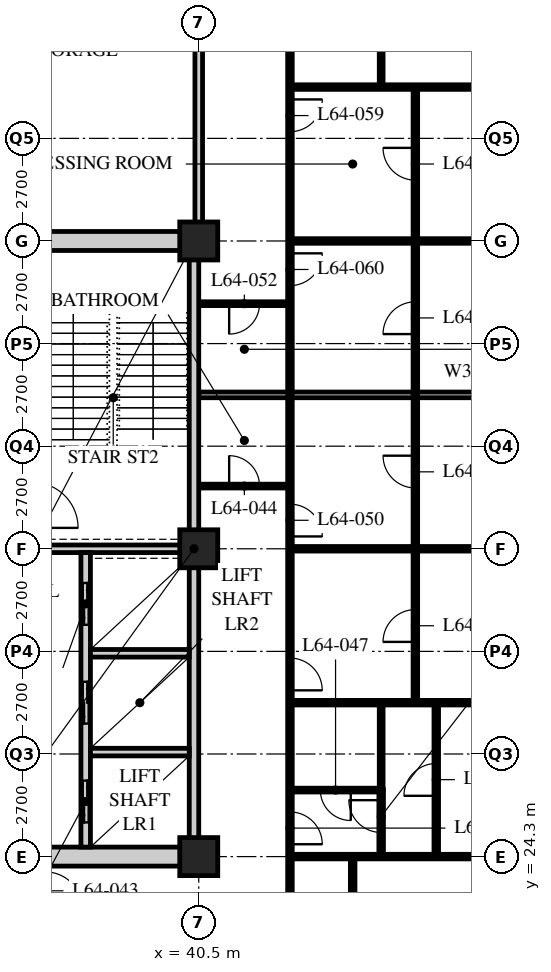
"""IFC4 building model, lengths in metres.
Left out: names, types, materials, properties, quantities, classifications, styles, units other than length and angle.
Written with IfcOpenShell. Run it as: python <this file> out.ifc"""

import sys

from ifc_helpers import new_model, si_unit, direction, frame, frame_2d, origin, origin_2d, place, context, subcontext, project, spatial, rectangle, hollow_rectangle, extrude, element, fill, save


model = new_model("IFC4")
c1 = context("Model", 3, precision=1e-05, world=origin(), true_north=direction((0.0, 1.0)))
c2 = subcontext(c1, "Body", "Model", "MODEL_VIEW")
j1 = project(units=[si_unit("LENGTHUNIT", "METRE"), si_unit("PLANEANGLEUNIT", "RADIAN")], contexts=[c1])
p1 = place(None, origin())
s1 = spatial("IfcSite", under=j1, at=p1, CompositionType="ELEMENT")
p2 = place(p1, origin())
s2 = spatial("IfcBuilding", under=s1, at=p2, CompositionType="ELEMENT")
p3 = place(p2, frame((0.0, 0.0, 250.2)))
s3 = spatial("IfcBuildingStorey", under=s2, at=p3, CompositionType="ELEMENT", Elevation=250.2)
for number, where, z_axis, x_axis in (
    (1, (40.5, 24.3, 0.0), (0.0, 0.0, 1.0), (1.0, 0.0, 0.0)),
    (2, (40.5, 32.4, 0.0), (0.0, 0.0, 1.0), (1.0, 0.0, 0.0)),
    (3, (40.5, 40.5, 0.0), (0.0, 0.0, 1.0), (1.0, 0.0, 0.0)),
):
    element("IfcColumn", number, at=place(p3, frame(where, z_axis=z_axis, x_axis=x_axis)), inside=s3, PredefinedType="COLUMN", context=c2, shape_type="SweptSolid", body=[
        extrude(hollow_rectangle(XDim=1.0, YDim=1.0, WallThickness=0.1, at=origin_2d()), origin(), (0.0, 0.0, 1.0), 3.9),
    ])
p4 = place(p3, frame((40.5, 40.5, 0.0), z_axis=(0.0, 0.0, 1.0), x_axis=(0.0, 1.0, 0.0)))
e4 = element("IfcWall", 4, at=p4, inside=s3, PredefinedType="SOLIDWALL", context=c2, shape_type="SweptSolid", body=[
    extrude(rectangle(XDim=10.35, YDim=0.2, at=frame_2d((5.175, 0.0))), origin(), (0.0, 0.0, 1.0), 3.078),
])
p5 = place(p3, frame((40.5, 34.05, 0.0), z_axis=(0.0, 0.0, 1.0), x_axis=(1.0, 0.0, 0.0)))
e5 = element("IfcWall", 5, at=p5, inside=s3, PredefinedType="PARTITIONING", context=c2, shape_type="SweptSolid", body=[
    extrude(rectangle(XDim=2.4, YDim=0.1, at=frame_2d((1.2, 0.0))), origin(), (0.0, 0.0, 1.0), 3.69),
])
p6 = place(p5, frame((0.8, 0.0, 0.0)))
e6 = element("IfcOpeningElement", 6, at=p6, cuts=e5, PredefinedType="OPENING", context=c2, shape_type="SweptSolid", body=[
    extrude(rectangle(XDim=0.8, YDim=2.1, at=frame_2d((0.4, 1.05))), frame((0.0, 0.06, 0.0), z_axis=(0.0, -1.0, 0.0), x_axis=(1.0, 0.0, 0.0)), (0.0, 0.0, 1.0), 0.12),
])
p7 = place(p3, frame((42.9, 22.5, 0.0), z_axis=(0.0, 0.0, 1.0), x_axis=(0.0, 1.0, 0.0)))
e7 = element("IfcWall", 7, at=p7, inside=s3, PredefinedType="PARTITIONING", context=c2, shape_type="SweptSolid", body=[
    extrude(rectangle(XDim=13.95, YDim=0.12, at=frame_2d((6.975, 0.0))), origin(), (0.0, 0.0, 1.0), 3.69),
])
p8 = place(p7, frame((2.125, 0.0, 0.0)))
e8 = element("IfcOpeningElement", 8, at=p8, cuts=e7, PredefinedType="OPENING", context=c2, shape_type="SweptSolid", body=[
    extrude(rectangle(XDim=0.85, YDim=2.1, at=frame_2d((0.425, 1.05))), frame((0.0, 0.07, 0.0), z_axis=(0.0, -1.0, 0.0), x_axis=(1.0, 0.0, 0.0)), (0.0, 0.0, 1.0), 0.14),
])
p9 = place(p7, frame((6.175, 0.0, 0.0)))
e9 = element("IfcOpeningElement", 9, at=p9, cuts=e7, PredefinedType="OPENING", context=c2, shape_type="SweptSolid", body=[
    extrude(rectangle(XDim=0.85, YDim=2.1, at=frame_2d((0.425, 1.05))), frame((0.0, 0.07, 0.0), z_axis=(0.0, -1.0, 0.0), x_axis=(1.0, 0.0, 0.0)), (0.0, 0.0, 1.0), 0.14),
])
p10 = place(p7, frame((10.225, 0.0, 0.0)))
e10 = element("IfcOpeningElement", 10, at=p10, cuts=e7, PredefinedType="OPENING", context=c2, shape_type="SweptSolid", body=[
    extrude(rectangle(XDim=0.85, YDim=2.1, at=frame_2d((0.425, 1.05))), frame((0.0, 0.07, 0.0), z_axis=(0.0, -1.0, 0.0), x_axis=(1.0, 0.0, 0.0)), (0.0, 0.0, 1.0), 0.14),
])
p11 = place(p3, frame((42.9, 24.3, 0.0), z_axis=(0.0, 0.0, 1.0), x_axis=(1.0, 0.0, 0.0)))
e11 = element("IfcWall", 11, at=p11, inside=s3, PredefinedType="PARTITIONING", context=c2, shape_type="SweptSolid", body=[
    extrude(rectangle(XDim=9.45, YDim=0.12, at=frame_2d((4.725, 0.0))), origin(), (0.0, 0.0, 1.0), 3.078),
])
p12 = place(p3, frame((40.5, 36.45, 0.0), z_axis=(0.0, 0.0, 1.0), x_axis=(1.0, 0.0, 0.0)))
e12 = element("IfcWall", 12, at=p12, inside=s3, PredefinedType="PARTITIONING", context=c2, shape_type="SweptSolid", body=[
    extrude(rectangle(XDim=15.9, YDim=0.15, at=frame_2d((7.95, 0.0))), origin(), (0.0, 0.0, 1.0), 3.69),
])
p13 = place(p3, frame((44.55, 16.5, 0.0), z_axis=(0.0, 0.0, 1.0), x_axis=(0.0, 1.0, 0.0)))
e13 = element("IfcWall", 13, at=p13, inside=s3, PredefinedType="PARTITIONING", context=c2, shape_type="SweptSolid", body=[
    extrude(rectangle(XDim=7.8, YDim=0.12, at=frame_2d((3.9, 0.0))), origin(), (0.0, 0.0, 1.0), 3.69),
])
p14 = place(p13, frame((3.475, 0.0, 0.0)))
e14 = element("IfcOpeningElement", 14, at=p14, cuts=e13, PredefinedType="OPENING", context=c2, shape_type="SweptSolid", body=[
    extrude(rectangle(XDim=0.85, YDim=2.1, at=frame_2d((0.425, 1.05))), frame((0.0, 0.07, 0.0), z_axis=(0.0, -1.0, 0.0), x_axis=(1.0, 0.0, 0.0)), (0.0, 0.0, 1.0), 0.14),
])
p15 = place(p3, frame((42.9, 26.05, 0.0), z_axis=(0.0, 0.0, 1.0), x_axis=(1.0, 0.0, 0.0)))
e15 = element("IfcWall", 15, at=p15, inside=s3, PredefinedType="PARTITIONING", context=c2, shape_type="SweptSolid", body=[
    extrude(rectangle(XDim=2.4, YDim=0.1, at=frame_2d((1.2, 0.0))), origin(), (0.0, 0.0, 1.0), 3.69),
])
p16 = place(p15, frame((0.8, 0.0, 0.0)))
e16 = element("IfcOpeningElement", 16, at=p16, cuts=e15, PredefinedType="OPENING", context=c2, shape_type="SweptSolid", body=[
    extrude(rectangle(XDim=0.8, YDim=2.1, at=frame_2d((0.4, 1.05))), frame((0.0, 0.06, 0.0), z_axis=(0.0, -1.0, 0.0), x_axis=(1.0, 0.0, 0.0)), (0.0, 0.0, 1.0), 0.12),
])
p17 = place(p3, frame((45.3, 26.05, 0.0), z_axis=(0.0, 0.0, 1.0), x_axis=(0.0, 1.0, 0.0)))
e17 = element("IfcWall", 17, at=p17, inside=s3, PredefinedType="PARTITIONING", context=c2, shape_type="SweptSolid", body=[
    extrude(rectangle(XDim=2.3, YDim=0.1, at=frame_2d((1.15, 0.0))), origin(), (0.0, 0.0, 1.0), 3.69),
])
p18 = place(p3, frame((42.9, 28.35, 0.0), z_axis=(0.0, 0.0, 1.0), x_axis=(1.0, 0.0, 0.0)))
e18 = element("IfcWall", 18, at=p18, inside=s3, PredefinedType="PARTITIONING", context=c2, shape_type="SweptSolid", body=[
    extrude(rectangle(XDim=13.5, YDim=0.12, at=frame_2d((6.75, 0.0))), origin(), (0.0, 0.0, 1.0), 3.69),
])
p19 = place(p3, frame((42.9, 32.4, 0.0), z_axis=(0.0, 0.0, 1.0), x_axis=(1.0, 0.0, 0.0)))
e19 = element("IfcWall", 19, at=p19, inside=s3, PredefinedType="PARTITIONING", context=c2, shape_type="SweptSolid", body=[
    extrude(rectangle(XDim=13.5, YDim=0.12, at=frame_2d((6.75, 0.0))), origin(), (0.0, 0.0, 1.0), 3.078),
])
p20 = place(p3, frame((40.5, 38.85, 0.0), z_axis=(0.0, 0.0, 1.0), x_axis=(1.0, 0.0, 0.0)))
e20 = element("IfcWall", 20, at=p20, inside=s3, PredefinedType="PARTITIONING", context=c2, shape_type="SweptSolid", body=[
    extrude(rectangle(XDim=2.4, YDim=0.1, at=frame_2d((1.2, 0.0))), origin(), (0.0, 0.0, 1.0), 3.69),
])
p21 = place(p20, frame((0.8, 0.0, 0.0)))
e21 = element("IfcOpeningElement", 21, at=p21, cuts=e20, PredefinedType="OPENING", context=c2, shape_type="SweptSolid", body=[
    extrude(rectangle(XDim=0.8, YDim=2.1, at=frame_2d((0.4, 1.05))), frame((0.0, 0.06, 0.0), z_axis=(0.0, -1.0, 0.0), x_axis=(1.0, 0.0, 0.0)), (0.0, 0.0, 1.0), 0.12),
])
p22 = place(p3, frame((42.9, 52.65, 0.0), z_axis=(0.0, 0.0, 1.0), x_axis=(0.0, -1.0, 0.0)))
e22 = element("IfcWall", 22, at=p22, inside=s3, PredefinedType="PARTITIONING", context=c2, shape_type="SweptSolid", body=[
    extrude(rectangle(XDim=16.2, YDim=0.12, at=frame_2d((8.1, 0.0))), origin(), (0.0, 0.0, 1.0), 3.69),
])
p23 = place(p22, frame((2.125, 0.0, 0.0)))
e23 = element("IfcOpeningElement", 23, at=p23, cuts=e22, PredefinedType="OPENING", context=c2, shape_type="SweptSolid", body=[
    extrude(rectangle(XDim=0.85, YDim=2.1, at=frame_2d((0.425, 1.05))), frame((0.0, 0.07, 0.0), z_axis=(0.0, -1.0, 0.0), x_axis=(1.0, 0.0, 0.0)), (0.0, 0.0, 1.0), 0.14),
])
p24 = place(p22, frame((8.425, 0.0, 0.0)))
e24 = element("IfcOpeningElement", 24, at=p24, cuts=e22, PredefinedType="OPENING", context=c2, shape_type="SweptSolid", body=[
    extrude(rectangle(XDim=0.85, YDim=2.1, at=frame_2d((0.425, 1.05))), frame((0.0, 0.07, 0.0), z_axis=(0.0, -1.0, 0.0), x_axis=(1.0, 0.0, 0.0)), (0.0, 0.0, 1.0), 0.14),
])
p25 = place(p22, frame((12.475, 0.0, 0.0)))
e25 = element("IfcOpeningElement", 25, at=p25, cuts=e22, PredefinedType="OPENING", context=c2, shape_type="SweptSolid", body=[
    extrude(rectangle(XDim=0.85, YDim=2.1, at=frame_2d((0.425, 1.05))), frame((0.0, 0.07, 0.0), z_axis=(0.0, -1.0, 0.0), x_axis=(1.0, 0.0, 0.0)), (0.0, 0.0, 1.0), 0.14),
])
p26 = place(p3, frame((45.3, 46.85, 0.0), z_axis=(0.0, 0.0, 1.0), x_axis=(0.0, -1.0, 0.0)))
e26 = element("IfcWall", 26, at=p26, inside=s3, PredefinedType="PARTITIONING", context=c2, shape_type="SweptSolid", body=[
    extrude(rectangle(XDim=2.3, YDim=0.1, at=frame_2d((1.15, 0.0))), origin(), (0.0, 0.0, 1.0), 3.69),
])
p27 = place(p3, frame((42.9, 44.55, 0.0), z_axis=(0.0, 0.0, 1.0), x_axis=(1.0, 0.0, 0.0)))
e27 = element("IfcWall", 27, at=p27, inside=s3, PredefinedType="PARTITIONING", context=c2, shape_type="SweptSolid", body=[
    extrude(rectangle(XDim=13.5, YDim=0.12, at=frame_2d((6.75, 0.0))), origin(), (0.0, 0.0, 1.0), 3.69),
])
p28 = place(p3, frame((42.9, 40.5, 0.0), z_axis=(0.0, 0.0, 1.0), x_axis=(1.0, 0.0, 0.0)))
e28 = element("IfcWall", 28, at=p28, inside=s3, PredefinedType="PARTITIONING", context=c2, shape_type="SweptSolid", body=[
    extrude(rectangle(XDim=13.5, YDim=0.12, at=frame_2d((6.75, 0.0))), origin(), (0.0, 0.0, 1.0), 3.078),
])
p29 = place(p3, frame((45.3, 24.3, 0.0), z_axis=(0.0, 0.0, 1.0), x_axis=(0.0, 1.0, 0.0)))
e29 = element("IfcWall", 29, at=p29, inside=s3, PredefinedType="PARTITIONING", context=c2, shape_type="SweptSolid", body=[
    extrude(rectangle(XDim=1.76, YDim=0.12, at=frame_2d((0.88, 0.0))), origin(), (0.0, 0.0, 1.0), 3.69),
])
p30 = place(p29, frame((0.635, 0.0, 0.0)))
e30 = element("IfcOpeningElement", 30, at=p30, cuts=e29, PredefinedType="OPENING", context=c2, shape_type="SweptSolid", body=[
    extrude(rectangle(XDim=0.85, YDim=2.1, at=frame_2d((0.425, 1.05))), frame((0.0, 0.07, 0.0), z_axis=(0.0, -1.0, 0.0), x_axis=(1.0, 0.0, 0.0)), (0.0, 0.0, 1.0), 0.14),
])
p31 = place(p3, frame((46.75, 24.3, 0.0), z_axis=(0.0, 0.0, 1.0), x_axis=(0.0, 1.0, 0.0)))
e31 = element("IfcWall", 31, at=p31, inside=s3, PredefinedType="PARTITIONING", context=c2, shape_type="SweptSolid", body=[
    extrude(rectangle(XDim=4.05, YDim=0.12, at=frame_2d((2.025, 0.0))), origin(), (0.0, 0.0, 1.0), 3.69),
])
p32 = place(p31, frame((1.6, 0.0, 0.0)))
e32 = element("IfcOpeningElement", 32, at=p32, cuts=e31, PredefinedType="OPENING", context=c2, shape_type="SweptSolid", body=[
    extrude(rectangle(XDim=0.85, YDim=2.1, at=frame_2d((0.425, 1.05))), frame((0.0, 0.07, 0.0), z_axis=(0.0, -1.0, 0.0), x_axis=(1.0, 0.0, 0.0)), (0.0, 0.0, 1.0), 0.14),
])
p33 = place(p3, frame((46.2, 28.35, 0.0), z_axis=(0.0, 0.0, 1.0), x_axis=(0.0, 1.0, 0.0)))
e33 = element("IfcWall", 33, at=p33, inside=s3, PredefinedType="PARTITIONING", context=c2, shape_type="SweptSolid", body=[
    extrude(rectangle(XDim=16.2, YDim=0.12, at=frame_2d((8.1, 0.0))), origin(), (0.0, 0.0, 1.0), 3.69),
])
p34 = place(p33, frame((1.6, 0.0, 0.0)))
e34 = element("IfcOpeningElement", 34, at=p34, cuts=e33, PredefinedType="OPENING", context=c2, shape_type="SweptSolid", body=[
    extrude(rectangle(XDim=0.85, YDim=2.1, at=frame_2d((0.425, 1.05))), frame((0.0, 0.07, 0.0), z_axis=(0.0, -1.0, 0.0), x_axis=(1.0, 0.0, 0.0)), (0.0, 0.0, 1.0), 0.14),
])
p35 = place(p33, frame((5.65, 0.0, 0.0)))
e35 = element("IfcOpeningElement", 35, at=p35, cuts=e33, PredefinedType="OPENING", context=c2, shape_type="SweptSolid", body=[
    extrude(rectangle(XDim=0.85, YDim=2.1, at=frame_2d((0.425, 1.05))), frame((0.0, 0.07, 0.0), z_axis=(0.0, -1.0, 0.0), x_axis=(1.0, 0.0, 0.0)), (0.0, 0.0, 1.0), 0.14),
])
p36 = place(p33, frame((13.75, 0.0, 0.0)))
e36 = element("IfcOpeningElement", 36, at=p36, cuts=e33, PredefinedType="OPENING", context=c2, shape_type="SweptSolid", body=[
    extrude(rectangle(XDim=0.85, YDim=2.1, at=frame_2d((0.425, 1.05))), frame((0.0, 0.07, 0.0), z_axis=(0.0, -1.0, 0.0), x_axis=(1.0, 0.0, 0.0)), (0.0, 0.0, 1.0), 0.14),
])
p37 = place(p33, frame((9.7, 0.0, 0.0)))
e37 = element("IfcOpeningElement", 37, at=p37, cuts=e33, PredefinedType="OPENING", context=c2, shape_type="SweptSolid", body=[
    extrude(rectangle(XDim=0.85, YDim=2.1, at=frame_2d((0.425, 1.05))), frame((0.0, 0.07, 0.0), z_axis=(0.0, -1.0, 0.0), x_axis=(1.0, 0.0, 0.0)), (0.0, 0.0, 1.0), 0.14),
])
p38 = place(p3, frame((15.95, 24.3, 0.0), z_axis=(0.0, 0.0, 1.0), x_axis=(1.0, 0.0, 0.0)))
e38 = element("IfcWall", 38, at=p38, inside=s3, PredefinedType="SOLIDWALL", context=c2, shape_type="SweptSolid", body=[
    extrude(rectangle(XDim=24.55, YDim=0.5, at=frame_2d((12.275, 0.0))), origin(), (0.0, 0.0, 1.0), 3.04),
])
p39 = place(p38, frame((11.5, 0.0, 0.0)))
e39 = element("IfcOpeningElement", 39, at=p39, cuts=e38, PredefinedType="OPENING", context=c2, shape_type="SweptSolid", body=[
    extrude(rectangle(XDim=1.8, YDim=2.4, at=frame_2d((0.9, 1.2))), frame((0.0, 0.26, 0.0), z_axis=(0.0, -1.0, 0.0), x_axis=(1.0, 0.0, 0.0)), (0.0, 0.0, 1.0), 0.52),
])
p40 = place(p3, frame((15.95, 40.5, 0.0), z_axis=(0.0, 0.0, 1.0), x_axis=(1.0, 0.0, 0.0)))
e40 = element("IfcWall", 40, at=p40, inside=s3, PredefinedType="SOLIDWALL", context=c2, shape_type="SweptSolid", body=[
    extrude(rectangle(XDim=24.55, YDim=0.5, at=frame_2d((12.275, 0.0))), origin(), (0.0, 0.0, 1.0), 3.04),
])
p41 = place(p40, frame((11.5, 0.0, 0.0)))
e41 = element("IfcOpeningElement", 41, at=p41, cuts=e40, PredefinedType="OPENING", context=c2, shape_type="SweptSolid", body=[
    extrude(rectangle(XDim=1.8, YDim=2.4, at=frame_2d((0.9, 1.2))), frame((0.0, 0.26, 0.0), z_axis=(0.0, -1.0, 0.0), x_axis=(1.0, 0.0, 0.0)), (0.0, 0.0, 1.0), 0.52),
])
p42 = place(p3, frame((40.375, 24.55, 0.0), z_axis=(0.0, 0.0, 1.0), x_axis=(0.0, 1.0, 0.0)))
e42 = element("IfcWall", 42, at=p42, inside=s3, PredefinedType="SOLIDWALL", context=c2, shape_type="SweptSolid", body=[
    extrude(rectangle(XDim=15.7, YDim=0.25, at=frame_2d((7.85, 0.0))), origin(), (0.0, 0.0, 1.0), 3.078),
])
p43 = place(p3, frame((32.3, 32.4, 0.0), z_axis=(0.0, 0.0, 1.0), x_axis=(1.0, 0.0, 0.0)))
e43 = element("IfcWall", 43, at=p43, inside=s3, PredefinedType="SOLIDWALL", context=c2, shape_type="SweptSolid", body=[
    extrude(rectangle(XDim=7.95, YDim=0.2, at=frame_2d((3.975, 0.0))), origin(), (0.0, 0.0, 1.0), 3.078),
])
p44 = place(p3, frame((37.525, 24.55, 0.0), z_axis=(0.0, 0.0, 1.0), x_axis=(0.0, 1.0, 0.0)))
e44 = element("IfcWall", 44, at=p44, inside=s3, PredefinedType="SOLIDWALL", context=c2, shape_type="SweptSolid", body=[
    extrude(rectangle(XDim=7.75, YDim=0.25, at=frame_2d((3.875, 0.0))), origin(), (0.0, 0.0, 1.0), 3.69),
])
p45 = place(p44, frame((0.65, 0.0, 0.0)))
e45 = element("IfcOpeningElement", 45, at=p45, cuts=e44, PredefinedType="OPENING", context=c2, shape_type="SweptSolid", body=[
    extrude(rectangle(XDim=1.1, YDim=2.4, at=frame_2d((0.55, 1.2))), frame((0.0, 0.135, 0.0), z_axis=(0.0, -1.0, 0.0), x_axis=(1.0, 0.0, 0.0)), (0.0, 0.0, 1.0), 0.27),
])
p46 = place(p44, frame((3.25, 0.0, 0.0)))
e46 = element("IfcOpeningElement", 46, at=p46, cuts=e44, PredefinedType="OPENING", context=c2, shape_type="SweptSolid", body=[
    extrude(rectangle(XDim=1.1, YDim=2.4, at=frame_2d((0.55, 1.2))), frame((0.0, 0.135, 0.0), z_axis=(0.0, -1.0, 0.0), x_axis=(1.0, 0.0, 0.0)), (0.0, 0.0, 1.0), 0.27),
])
p47 = place(p44, frame((5.85, 0.0, 0.0)))
e47 = element("IfcOpeningElement", 47, at=p47, cuts=e44, PredefinedType="OPENING", context=c2, shape_type="SweptSolid", body=[
    extrude(rectangle(XDim=1.1, YDim=2.4, at=frame_2d((0.55, 1.2))), frame((0.0, 0.135, 0.0), z_axis=(0.0, -1.0, 0.0), x_axis=(1.0, 0.0, 0.0)), (0.0, 0.0, 1.0), 0.27),
])
for number, where, z_axis, x_axis in (
    (48, (37.65, 27.05, 0.0), (0.0, 0.0, 1.0), (1.0, 0.0, 0.0)),
    (49, (37.65, 29.65, 0.0), (0.0, 0.0, 1.0), (1.0, 0.0, 0.0)),
):
    element("IfcWall", number, at=place(p3, frame(where, z_axis=z_axis, x_axis=x_axis)), inside=s3, PredefinedType="SOLIDWALL", context=c2, shape_type="SweptSolid", body=[
        extrude(rectangle(XDim=2.6, YDim=0.2, at=frame_2d((1.3, 0.0))), origin(), (0.0, 0.0, 1.0), 3.69),
    ])
p48 = place(p6, origin())
e50 = element("IfcDoor", 50, at=p48, inside=s3, OperationType="SINGLE_SWING_LEFT", PredefinedType="DOOR", context=c2, shape_type="SweptSolid", body=[
    extrude(rectangle(XDim=0.8, YDim=2.1, at=frame_2d((0.4, 1.05))), frame((0.0, 0.025, 0.0), z_axis=(0.0, -1.0, 0.0), x_axis=(1.0, 0.0, 0.0)), (0.0, 0.0, 1.0), 0.05),
])
fill(e6, e50)
p49 = place(p16, origin())
e51 = element("IfcDoor", 51, at=p49, inside=s3, OperationType="SINGLE_SWING_LEFT", PredefinedType="DOOR", context=c2, shape_type="SweptSolid", body=[
    extrude(rectangle(XDim=0.8, YDim=2.1, at=frame_2d((0.4, 1.05))), frame((0.0, 0.025, 0.0), z_axis=(0.0, -1.0, 0.0), x_axis=(1.0, 0.0, 0.0)), (0.0, 0.0, 1.0), 0.05),
])
fill(e16, e51)
p50 = place(p8, origin())
e52 = element("IfcDoor", 52, at=p50, inside=s3, OperationType="SINGLE_SWING_RIGHT", PredefinedType="DOOR", context=c2, shape_type="SweptSolid", body=[
    extrude(rectangle(XDim=0.85, YDim=2.1, at=frame_2d((0.425, 1.05))), frame((0.0, 0.025, 0.0), z_axis=(0.0, -1.0, 0.0), x_axis=(1.0, 0.0, 0.0)), (0.0, 0.0, 1.0), 0.05),
])
fill(e8, e52)
p51 = place(p9, origin())
e53 = element("IfcDoor", 53, at=p51, inside=s3, OperationType="SINGLE_SWING_RIGHT", PredefinedType="DOOR", context=c2, shape_type="SweptSolid", body=[
    extrude(rectangle(XDim=0.85, YDim=2.1, at=frame_2d((0.425, 1.05))), frame((0.0, 0.025, 0.0), z_axis=(0.0, -1.0, 0.0), x_axis=(1.0, 0.0, 0.0)), (0.0, 0.0, 1.0), 0.05),
])
fill(e9, e53)
p52 = place(p10, origin())
e54 = element("IfcDoor", 54, at=p52, inside=s3, OperationType="SINGLE_SWING_RIGHT", PredefinedType="DOOR", context=c2, shape_type="SweptSolid", body=[
    extrude(rectangle(XDim=0.85, YDim=2.1, at=frame_2d((0.425, 1.05))), frame((0.0, 0.025, 0.0), z_axis=(0.0, -1.0, 0.0), x_axis=(1.0, 0.0, 0.0)), (0.0, 0.0, 1.0), 0.05),
])
fill(e10, e54)
p53 = place(p21, origin())
e55 = element("IfcDoor", 55, at=p53, inside=s3, OperationType="SINGLE_SWING_RIGHT", PredefinedType="DOOR", context=c2, shape_type="SweptSolid", body=[
    extrude(rectangle(XDim=0.8, YDim=2.1, at=frame_2d((0.4, 1.05))), frame((0.0, 0.025, 0.0), z_axis=(0.0, -1.0, 0.0), x_axis=(1.0, 0.0, 0.0)), (0.0, 0.0, 1.0), 0.05),
])
fill(e21, e55)
p54 = place(p24, origin())
e56 = element("IfcDoor", 56, at=p54, inside=s3, OperationType="SINGLE_SWING_LEFT", PredefinedType="DOOR", context=c2, shape_type="SweptSolid", body=[
    extrude(rectangle(XDim=0.85, YDim=2.1, at=frame_2d((0.425, 1.05))), frame((0.0, 0.025, 0.0), z_axis=(0.0, -1.0, 0.0), x_axis=(1.0, 0.0, 0.0)), (0.0, 0.0, 1.0), 0.05),
])
fill(e24, e56)
p55 = place(p25, origin())
e57 = element("IfcDoor", 57, at=p55, inside=s3, OperationType="SINGLE_SWING_LEFT", PredefinedType="DOOR", context=c2, shape_type="SweptSolid", body=[
    extrude(rectangle(XDim=0.85, YDim=2.1, at=frame_2d((0.425, 1.05))), frame((0.0, 0.025, 0.0), z_axis=(0.0, -1.0, 0.0), x_axis=(1.0, 0.0, 0.0)), (0.0, 0.0, 1.0), 0.05),
])
fill(e25, e57)
p56 = place(p30, origin())
e58 = element("IfcDoor", 58, at=p56, inside=s3, OperationType="SINGLE_SWING_RIGHT", PredefinedType="DOOR", context=c2, shape_type="SweptSolid", body=[
    extrude(rectangle(XDim=0.85, YDim=2.1, at=frame_2d((0.425, 1.05))), frame((0.0, 0.025, 0.0), z_axis=(0.0, -1.0, 0.0), x_axis=(1.0, 0.0, 0.0)), (0.0, 0.0, 1.0), 0.05),
])
fill(e30, e58)
p57 = place(p32, origin())
e59 = element("IfcDoor", 59, at=p57, inside=s3, OperationType="SINGLE_SWING_LEFT", PredefinedType="DOOR", context=c2, shape_type="SweptSolid", body=[
    extrude(rectangle(XDim=0.85, YDim=2.1, at=frame_2d((0.425, 1.05))), frame((0.0, 0.025, 0.0), z_axis=(0.0, -1.0, 0.0), x_axis=(1.0, 0.0, 0.0)), (0.0, 0.0, 1.0), 0.05),
])
fill(e32, e59)
p58 = place(p34, origin())
e60 = element("IfcDoor", 60, at=p58, inside=s3, OperationType="SINGLE_SWING_LEFT", PredefinedType="DOOR", context=c2, shape_type="SweptSolid", body=[
    extrude(rectangle(XDim=0.85, YDim=2.1, at=frame_2d((0.425, 1.05))), frame((0.0, 0.025, 0.0), z_axis=(0.0, -1.0, 0.0), x_axis=(1.0, 0.0, 0.0)), (0.0, 0.0, 1.0), 0.05),
])
fill(e34, e60)
p59 = place(p35, origin())
e61 = element("IfcDoor", 61, at=p59, inside=s3, OperationType="SINGLE_SWING_RIGHT", PredefinedType="DOOR", context=c2, shape_type="SweptSolid", body=[
    extrude(rectangle(XDim=0.85, YDim=2.1, at=frame_2d((0.425, 1.05))), frame((0.0, 0.025, 0.0), z_axis=(0.0, -1.0, 0.0), x_axis=(1.0, 0.0, 0.0)), (0.0, 0.0, 1.0), 0.05),
])
fill(e35, e61)
p60 = place(p36, origin())
e62 = element("IfcDoor", 62, at=p60, inside=s3, OperationType="SINGLE_SWING_RIGHT", PredefinedType="DOOR", context=c2, shape_type="SweptSolid", body=[
    extrude(rectangle(XDim=0.85, YDim=2.1, at=frame_2d((0.425, 1.05))), frame((0.0, 0.025, 0.0), z_axis=(0.0, -1.0, 0.0), x_axis=(1.0, 0.0, 0.0)), (0.0, 0.0, 1.0), 0.05),
])
fill(e36, e62)
p61 = place(p37, origin())
e63 = element("IfcDoor", 63, at=p61, inside=s3, OperationType="SINGLE_SWING_LEFT", PredefinedType="DOOR", context=c2, shape_type="SweptSolid", body=[
    extrude(rectangle(XDim=0.85, YDim=2.1, at=frame_2d((0.425, 1.05))), frame((0.0, 0.025, 0.0), z_axis=(0.0, -1.0, 0.0), x_axis=(1.0, 0.0, 0.0)), (0.0, 0.0, 1.0), 0.05),
])
fill(e37, e63)
p62 = place(p45, origin())
e64 = element("IfcDoor", 64, at=p62, inside=s3, OperationType="DOUBLE_DOOR_SLIDING", PredefinedType="DOOR", context=c2, shape_type="SweptSolid", body=[
    extrude(rectangle(XDim=1.1, YDim=2.4, at=frame_2d((0.55, 1.2))), frame((0.0, 0.025, 0.0), z_axis=(0.0, -1.0, 0.0), x_axis=(1.0, 0.0, 0.0)), (0.0, 0.0, 1.0), 0.05),
])
fill(e45, e64)
p63 = place(p46, origin())
e65 = element("IfcDoor", 65, at=p63, inside=s3, OperationType="DOUBLE_DOOR_SLIDING", PredefinedType="DOOR", context=c2, shape_type="SweptSolid", body=[
    extrude(rectangle(XDim=1.1, YDim=2.4, at=frame_2d((0.55, 1.2))), frame((0.0, 0.025, 0.0), z_axis=(0.0, -1.0, 0.0), x_axis=(1.0, 0.0, 0.0)), (0.0, 0.0, 1.0), 0.05),
])
fill(e46, e65)
p64 = place(p47, origin())
e66 = element("IfcDoor", 66, at=p64, inside=s3, OperationType="DOUBLE_DOOR_SLIDING", PredefinedType="DOOR", context=c2, shape_type="SweptSolid", body=[
    extrude(rectangle(XDim=1.1, YDim=2.4, at=frame_2d((0.55, 1.2))), frame((0.0, 0.025, 0.0), z_axis=(0.0, -1.0, 0.0), x_axis=(1.0, 0.0, 0.0)), (0.0, 0.0, 1.0), 0.05),
])
fill(e47, e66)
save(model, sys.argv[1])
